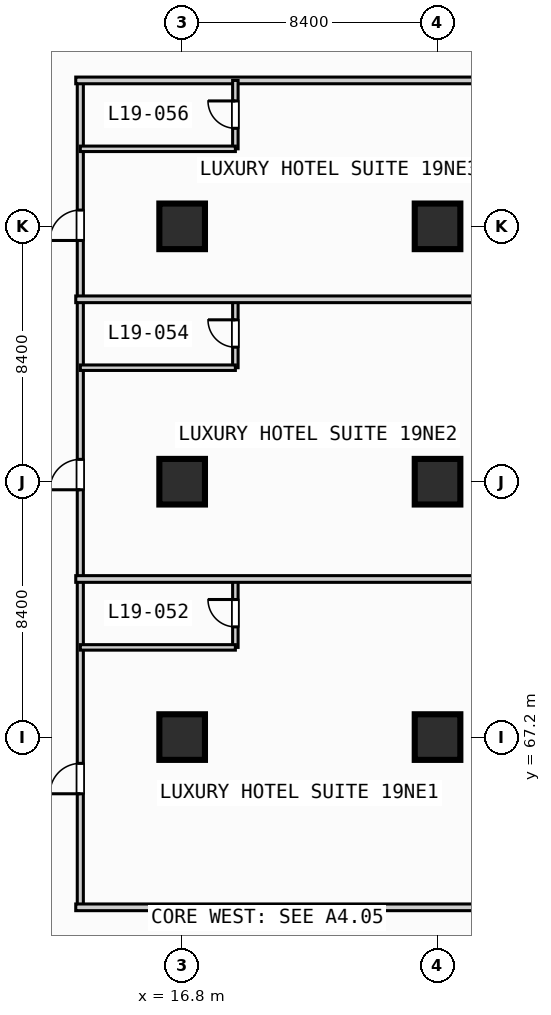
"""IFC4 building model, lengths in metres.
Left out: names, types, materials, properties, quantities, classifications, styles, units other than length and angle.
Written with IfcOpenShell. Run it as: python <this file> out.ifc"""

import sys

from ifc_helpers import new_model, si_unit, direction, frame, frame_2d, origin, origin_2d, place, context, subcontext, project, spatial, rectangle, extrude, element, fill, save


model = new_model("IFC4")
c1 = context("Model", 3, precision=1e-05, world=origin(), true_north=direction((0.0, 1.0)))
c2 = subcontext(c1, "Body", "Model", "MODEL_VIEW")
j1 = project(units=[si_unit("LENGTHUNIT", "METRE"), si_unit("PLANEANGLEUNIT", "RADIAN")], contexts=[c1])
p1 = place(None, origin())
s1 = spatial("IfcSite", under=j1, at=p1, CompositionType="ELEMENT")
p2 = place(p1, origin())
s2 = spatial("IfcBuilding", under=s1, at=p2, CompositionType="ELEMENT")
p3 = place(p2, frame((0.0, 0.0, 81.4)))
s3 = spatial("IfcBuildingStorey", under=s2, at=p3, CompositionType="ELEMENT", Elevation=81.4)
for number, where, z_axis, x_axis in (
    (1, (16.8, 67.2, 0.0), (0.0, 0.0, 1.0), (1.0, 0.0, 0.0)),
    (2, (16.8, 75.6, 0.0), (0.0, 0.0, 1.0), (1.0, 0.0, 0.0)),
    (3, (16.8, 84.0, 0.0), (0.0, 0.0, 1.0), (1.0, 0.0, 0.0)),
    (4, (25.2, 67.2, 0.0), (0.0, 0.0, 1.0), (1.0, 0.0, 0.0)),
    (5, (25.2, 75.6, 0.0), (0.0, 0.0, 1.0), (1.0, 0.0, 0.0)),
    (6, (25.2, 84.0, 0.0), (0.0, 0.0, 1.0), (1.0, 0.0, 0.0)),
):
    element("IfcColumn", number, at=place(p3, frame(where, z_axis=z_axis, x_axis=x_axis)), inside=s3, PredefinedType="COLUMN", context=c2, shape_type="SweptSolid", body=[
        extrude(rectangle(XDim=1.5, YDim=1.5, at=origin_2d()), origin(), (0.0, 0.0, 1.0), 3.8),
    ])
p4 = place(p3, frame((13.45, 61.6, 0.0), z_axis=(0.0, 0.0, 1.0), x_axis=(0.0, 1.0, 0.0)))
e7 = element("IfcWall", 7, at=p4, inside=s3, PredefinedType="PARTITIONING", context=c2, shape_type="SweptSolid", body=[
    extrude(rectangle(XDim=27.2, YDim=0.2, at=frame_2d((13.6, 0.0))), origin(), (0.0, 0.0, 1.0), 3.55),
])
p5 = place(p4, frame((3.735, 0.0, 0.0)))
e8 = element("IfcOpeningElement", 8, at=p5, cuts=e7, PredefinedType="OPENING", context=c2, shape_type="SweptSolid", body=[
    extrude(rectangle(XDim=1.0, YDim=2.15, at=frame_2d((0.5, 1.075))), frame((0.0, 0.11, 0.0), z_axis=(0.0, -1.0, 0.0), x_axis=(1.0, 0.0, 0.0)), (0.0, 0.0, 1.0), 0.22),
])
p6 = place(p4, frame((13.735, 0.0, 0.0)))
e9 = element("IfcOpeningElement", 9, at=p6, cuts=e7, PredefinedType="OPENING", context=c2, shape_type="SweptSolid", body=[
    extrude(rectangle(XDim=1.0, YDim=2.15, at=frame_2d((0.5, 1.075))), frame((0.0, 0.11, 0.0), z_axis=(0.0, -1.0, 0.0), x_axis=(1.0, 0.0, 0.0)), (0.0, 0.0, 1.0), 0.22),
])
p7 = place(p4, frame((21.935, 0.0, 0.0)))
e10 = element("IfcOpeningElement", 10, at=p7, cuts=e7, PredefinedType="OPENING", context=c2, shape_type="SweptSolid", body=[
    extrude(rectangle(XDim=1.0, YDim=2.15, at=frame_2d((0.5, 1.075))), frame((0.0, 0.11, 0.0), z_axis=(0.0, -1.0, 0.0), x_axis=(1.0, 0.0, 0.0)), (0.0, 0.0, 1.0), 0.22),
])
p8 = place(p3, frame((13.3, 61.6, 0.0), z_axis=(0.0, 0.0, 1.0), x_axis=(1.0, 0.0, 0.0)))
e11 = element("IfcWall", 11, at=p8, inside=s3, PredefinedType="PARTITIONING", context=c2, shape_type="SweptSolid", body=[
    extrude(rectangle(XDim=20.13, YDim=0.22, at=frame_2d((10.065, 0.0))), origin(), (0.0, 0.0, 1.0), 3.55),
])
p9 = place(p3, frame((18.55, 70.15, 0.0), z_axis=(0.0, 0.0, 1.0), x_axis=(0.0, 1.0, 0.0)))
e12 = element("IfcWall", 12, at=p9, inside=s3, PredefinedType="PLUMBINGWALL", context=c2, shape_type="SweptSolid", body=[
    extrude(rectangle(XDim=2.25, YDim=0.18, at=frame_2d((1.125, 0.0))), origin(), (0.0, 0.0, 1.0), 3.55),
])
p10 = place(p9, frame((0.675, 0.0, 0.0)))
e13 = element("IfcOpeningElement", 13, at=p10, cuts=e12, PredefinedType="OPENING", context=c2, shape_type="SweptSolid", body=[
    extrude(rectangle(XDim=0.9, YDim=2.1, at=frame_2d((0.45, 1.05))), frame((0.0, 0.1, 0.0), z_axis=(0.0, -1.0, 0.0), x_axis=(1.0, 0.0, 0.0)), (0.0, 0.0, 1.0), 0.2),
])
p11 = place(p3, frame((13.45, 70.15, 0.0), z_axis=(0.0, 0.0, 1.0), x_axis=(1.0, 0.0, 0.0)))
e14 = element("IfcWall", 14, at=p11, inside=s3, PredefinedType="PLUMBINGWALL", context=c2, shape_type="SweptSolid", body=[
    extrude(rectangle(XDim=5.1, YDim=0.18, at=frame_2d((2.55, 0.0))), origin(), (0.0, 0.0, 1.0), 3.55),
])
p12 = place(p3, frame((13.3, 72.4, 0.0), z_axis=(0.0, 0.0, 1.0), x_axis=(1.0, 0.0, 0.0)))
e15 = element("IfcWall", 15, at=p12, inside=s3, PredefinedType="PARTITIONING", context=c2, shape_type="SweptSolid", body=[
    extrude(rectangle(XDim=20.13, YDim=0.22, at=frame_2d((10.065, 0.0))), origin(), (0.0, 0.0, 1.0), 3.55),
])
p13 = place(p3, frame((18.55, 79.35, 0.0), z_axis=(0.0, 0.0, 1.0), x_axis=(0.0, 1.0, 0.0)))
e16 = element("IfcWall", 16, at=p13, inside=s3, PredefinedType="PLUMBINGWALL", context=c2, shape_type="SweptSolid", body=[
    extrude(rectangle(XDim=2.25, YDim=0.18, at=frame_2d((1.125, 0.0))), origin(), (0.0, 0.0, 1.0), 3.55),
])
p14 = place(p13, frame((0.675, 0.0, 0.0)))
e17 = element("IfcOpeningElement", 17, at=p14, cuts=e16, PredefinedType="OPENING", context=c2, shape_type="SweptSolid", body=[
    extrude(rectangle(XDim=0.9, YDim=2.1, at=frame_2d((0.45, 1.05))), frame((0.0, 0.1, 0.0), z_axis=(0.0, -1.0, 0.0), x_axis=(1.0, 0.0, 0.0)), (0.0, 0.0, 1.0), 0.2),
])
p15 = place(p3, frame((13.45, 79.35, 0.0), z_axis=(0.0, 0.0, 1.0), x_axis=(1.0, 0.0, 0.0)))
e18 = element("IfcWall", 18, at=p15, inside=s3, PredefinedType="PLUMBINGWALL", context=c2, shape_type="SweptSolid", body=[
    extrude(rectangle(XDim=5.1, YDim=0.18, at=frame_2d((2.55, 0.0))), origin(), (0.0, 0.0, 1.0), 3.55),
])
for number, where, z_axis, x_axis in (
    (19, (13.3, 81.6, 0.0), (0.0, 0.0, 1.0), (1.0, 0.0, 0.0)),
    (20, (13.3, 88.8, 0.0), (0.0, 0.0, 1.0), (1.0, 0.0, 0.0)),
):
    element("IfcWall", number, at=place(p3, frame(where, z_axis=z_axis, x_axis=x_axis)), inside=s3, PredefinedType="PARTITIONING", context=c2, shape_type="SweptSolid", body=[
        extrude(rectangle(XDim=20.13, YDim=0.22, at=frame_2d((10.065, 0.0))), origin(), (0.0, 0.0, 1.0), 3.55),
    ])
p16 = place(p3, frame((18.55, 86.55, 0.0), z_axis=(0.0, 0.0, 1.0), x_axis=(0.0, 1.0, 0.0)))
e21 = element("IfcWall", 21, at=p16, inside=s3, PredefinedType="PLUMBINGWALL", context=c2, shape_type="SweptSolid", body=[
    extrude(rectangle(XDim=2.25, YDim=0.18, at=frame_2d((1.125, 0.0))), origin(), (0.0, 0.0, 1.0), 3.55),
])
p17 = place(p16, frame((0.675, 0.0, 0.0)))
e22 = element("IfcOpeningElement", 22, at=p17, cuts=e21, PredefinedType="OPENING", context=c2, shape_type="SweptSolid", body=[
    extrude(rectangle(XDim=0.9, YDim=2.1, at=frame_2d((0.45, 1.05))), frame((0.0, 0.1, 0.0), z_axis=(0.0, -1.0, 0.0), x_axis=(1.0, 0.0, 0.0)), (0.0, 0.0, 1.0), 0.2),
])
p18 = place(p3, frame((13.45, 86.55, 0.0), z_axis=(0.0, 0.0, 1.0), x_axis=(1.0, 0.0, 0.0)))
e23 = element("IfcWall", 23, at=p18, inside=s3, PredefinedType="PLUMBINGWALL", context=c2, shape_type="SweptSolid", body=[
    extrude(rectangle(XDim=5.1, YDim=0.18, at=frame_2d((2.55, 0.0))), origin(), (0.0, 0.0, 1.0), 3.55),
])
p19 = place(p5, origin())
e24 = element("IfcDoor", 24, at=p19, inside=s3, OperationType="SINGLE_SWING_LEFT", PredefinedType="DOOR", context=c2, shape_type="SweptSolid", body=[
    extrude(rectangle(XDim=1.0, YDim=2.15, at=frame_2d((0.5, 1.075))), frame((0.0, 0.025, 0.0), z_axis=(0.0, -1.0, 0.0), x_axis=(1.0, 0.0, 0.0)), (0.0, 0.0, 1.0), 0.05),
])
fill(e8, e24)
p20 = place(p6, origin())
e25 = element("IfcDoor", 25, at=p20, inside=s3, OperationType="SINGLE_SWING_LEFT", PredefinedType="DOOR", context=c2, shape_type="SweptSolid", body=[
    extrude(rectangle(XDim=1.0, YDim=2.15, at=frame_2d((0.5, 1.075))), frame((0.0, 0.025, 0.0), z_axis=(0.0, -1.0, 0.0), x_axis=(1.0, 0.0, 0.0)), (0.0, 0.0, 1.0), 0.05),
])
fill(e9, e25)
p21 = place(p7, origin())
e26 = element("IfcDoor", 26, at=p21, inside=s3, OperationType="SINGLE_SWING_LEFT", PredefinedType="DOOR", context=c2, shape_type="SweptSolid", body=[
    extrude(rectangle(XDim=1.0, YDim=2.15, at=frame_2d((0.5, 1.075))), frame((0.0, 0.025, 0.0), z_axis=(0.0, -1.0, 0.0), x_axis=(1.0, 0.0, 0.0)), (0.0, 0.0, 1.0), 0.05),
])
fill(e10, e26)
p22 = place(p10, origin())
e27 = element("IfcDoor", 27, at=p22, inside=s3, OperationType="SINGLE_SWING_RIGHT", PredefinedType="DOOR", context=c2, shape_type="SweptSolid", body=[
    extrude(rectangle(XDim=0.9, YDim=2.1, at=frame_2d((0.45, 1.05))), frame((0.0, 0.025, 0.0), z_axis=(0.0, -1.0, 0.0), x_axis=(1.0, 0.0, 0.0)), (0.0, 0.0, 1.0), 0.05),
])
fill(e13, e27)
p23 = place(p14, origin())
e28 = element("IfcDoor", 28, at=p23, inside=s3, OperationType="SINGLE_SWING_RIGHT", PredefinedType="DOOR", context=c2, shape_type="SweptSolid", body=[
    extrude(rectangle(XDim=0.9, YDim=2.1, at=frame_2d((0.45, 1.05))), frame((0.0, 0.025, 0.0), z_axis=(0.0, -1.0, 0.0), x_axis=(1.0, 0.0, 0.0)), (0.0, 0.0, 1.0), 0.05),
])
fill(e17, e28)
p24 = place(p17, origin())
e29 = element("IfcDoor", 29, at=p24, inside=s3, OperationType="SINGLE_SWING_RIGHT", PredefinedType="DOOR", context=c2, shape_type="SweptSolid", body=[
    extrude(rectangle(XDim=0.9, YDim=2.1, at=frame_2d((0.45, 1.05))), frame((0.0, 0.025, 0.0), z_axis=(0.0, -1.0, 0.0), x_axis=(1.0, 0.0, 0.0)), (0.0, 0.0, 1.0), 0.05),
])
fill(e22, e29)
save(model, sys.argv[1])
